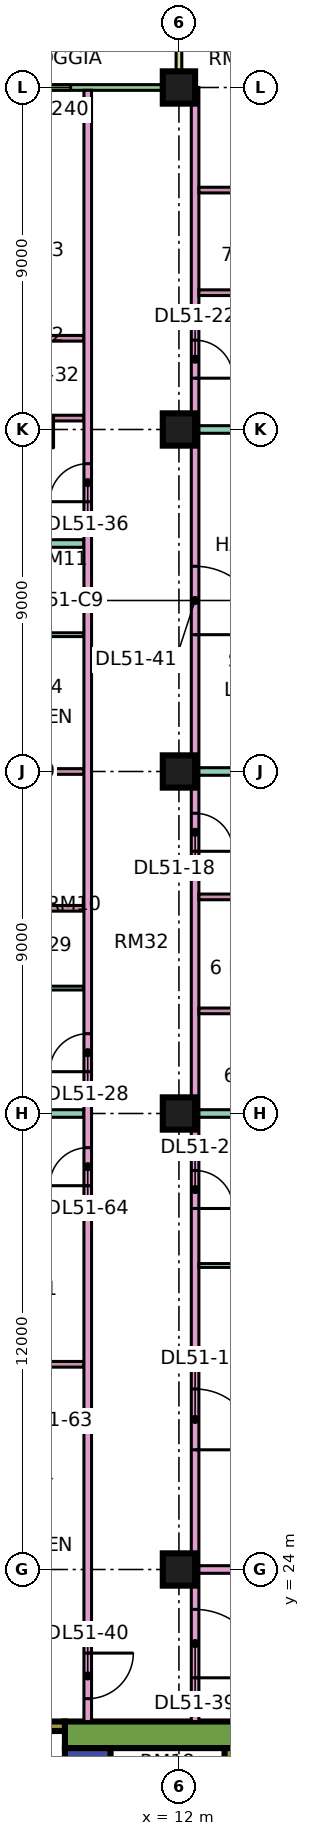
"""IFC4 building model, lengths in metres.
Left out: names, types, materials, properties, quantities, classifications, styles, units other than length and angle.
Written with IfcOpenShell. Run it as: python <this file> out.ifc"""

import sys

from ifc_helpers import new_model, si_unit, direction, frame, frame_2d, origin, origin_2d, place, context, subcontext, project, spatial, rectangle, extrude, element, fill, save


model = new_model("IFC4")
c1 = context("Model", 3, precision=1e-05, world=origin(), true_north=direction((0.0, 1.0)))
c2 = subcontext(c1, "Body", "Model", "MODEL_VIEW")
j1 = project(units=[si_unit("LENGTHUNIT", "METRE"), si_unit("PLANEANGLEUNIT", "RADIAN")], contexts=[c1])
p1 = place(None, origin())
s1 = spatial("IfcSite", under=j1, at=p1, CompositionType="ELEMENT")
p2 = place(p1, origin())
s2 = spatial("IfcBuilding", under=s1, at=p2, CompositionType="ELEMENT")
p3 = place(p2, frame((0.0, 0.0, 219.15)))
s3 = spatial("IfcBuildingStorey", under=s2, at=p3, CompositionType="ELEMENT", Elevation=219.15)
for number, where, z_axis, x_axis in (
    (1, (12.0, 24.0, 0.0), (0.0, 0.0, 1.0), (1.0, 0.0, 0.0)),
    (2, (12.0, 36.0, 0.0), (0.0, 0.0, 1.0), (1.0, 0.0, 0.0)),
    (3, (12.0, 45.0, 0.0), (0.0, 0.0, 1.0), (1.0, 0.0, 0.0)),
    (4, (12.0, 54.0, 0.0), (0.0, 0.0, 1.0), (1.0, 0.0, 0.0)),
    (5, (12.0, 63.0, 0.0), (0.0, 0.0, 1.0), (1.0, 0.0, 0.0)),
):
    element("IfcColumn", number, at=place(p3, frame(where, z_axis=z_axis, x_axis=x_axis)), inside=s3, PredefinedType="COLUMN", context=c2, shape_type="SweptSolid", body=[
        extrude(rectangle(XDim=0.85, YDim=0.85, at=origin_2d()), origin(), (0.0, 0.0, 1.0), 3.75),
    ])
p4 = place(p3, frame((9.0, 19.65, 0.0), z_axis=(0.0, 0.0, 1.0), x_axis=(1.0, 0.0, 0.0)))
e6 = element("IfcWall", 6, at=p4, inside=s3, PredefinedType="SHEAR", context=c2, shape_type="SweptSolid", body=[
    extrude(rectangle(XDim=25.0, YDim=0.7, at=frame_2d((12.5, 0.0))), origin(), (0.0, 0.0, 1.0), 3.75),
])
p5 = place(p4, frame((19.1, 0.0, 0.0)))
e7 = element("IfcOpeningElement", 7, at=p5, cuts=e6, PredefinedType="OPENING", context=c2, shape_type="SweptSolid", body=[
    extrude(rectangle(XDim=1.8, YDim=2.4, at=frame_2d((0.9, 1.2))), frame((0.0, 0.36, 0.0), z_axis=(0.0, -1.0, 0.0), x_axis=(1.0, 0.0, 0.0)), (0.0, 0.0, 1.0), 0.72),
])
p6 = place(p3, frame((9.6, 7.7, 0.0), z_axis=(0.0, 0.0, 1.0), x_axis=(0.0, 1.0, 0.0)))
e8 = element("IfcWall", 8, at=p6, inside=s3, PredefinedType="SHEAR", context=c2, shape_type="SweptSolid", body=[
    extrude(rectangle(XDim=11.6, YDim=1.2, at=frame_2d((5.8, 0.0))), origin(), (0.0, 0.0, 1.0), 3.75),
])
p7 = place(p6, frame((4.175, 0.0, 0.0)))
e9 = element("IfcOpeningElement", 9, at=p7, cuts=e8, PredefinedType="OPENING", context=c2, shape_type="SweptSolid", body=[
    extrude(rectangle(XDim=1.1, YDim=2.2, at=frame_2d((0.55, 1.1))), frame((0.0, 0.61, 0.0), z_axis=(0.0, -1.0, 0.0), x_axis=(1.0, 0.0, 0.0)), (0.0, 0.0, 1.0), 1.22),
])
p8 = place(p6, frame((6.675, 0.0, 0.0)))
e10 = element("IfcOpeningElement", 10, at=p8, cuts=e8, PredefinedType="OPENING", context=c2, shape_type="SweptSolid", body=[
    extrude(rectangle(XDim=1.1, YDim=2.2, at=frame_2d((0.55, 1.1))), frame((0.0, 0.61, 0.0), z_axis=(0.0, -1.0, 0.0), x_axis=(1.0, 0.0, 0.0)), (0.0, 0.0, 1.0), 1.22),
])
p9 = place(p6, frame((9.55, 0.0, 0.0)))
e11 = element("IfcOpeningElement", 11, at=p9, cuts=e8, PredefinedType="OPENING", context=c2, shape_type="SweptSolid", body=[
    extrude(rectangle(XDim=1.1, YDim=2.2, at=frame_2d((0.55, 1.1))), frame((0.0, 0.61, 0.0), z_axis=(0.0, -1.0, 0.0), x_axis=(1.0, 0.0, 0.0)), (0.0, 0.0, 1.0), 1.22),
])
p10 = place(p6, frame((1.85, 0.0, 0.0)))
e12 = element("IfcOpeningElement", 12, at=p10, cuts=e8, PredefinedType="OPENING", context=c2, shape_type="SweptSolid", body=[
    extrude(rectangle(XDim=0.9, YDim=2.1, at=frame_2d((0.45, 1.05))), frame((0.0, 0.61, 0.0), z_axis=(0.0, -1.0, 0.0), x_axis=(1.0, 0.0, 0.0)), (0.0, 0.0, 1.0), 1.22),
])
p11 = place(p3, frame((13.325, 7.7, 0.0), z_axis=(0.0, 0.0, 1.0), x_axis=(0.0, 1.0, 0.0)))
e13 = element("IfcWall", 13, at=p11, inside=s3, PredefinedType="SHEAR", context=c2, shape_type="SweptSolid", body=[
    extrude(rectangle(XDim=11.6, YDim=0.25, at=frame_2d((5.8, 0.0))), origin(), (0.0, 0.0, 1.0), 3.75),
])
p12 = place(p3, frame((2.1, 19.875, 0.0), z_axis=(0.0, 0.0, 1.0), x_axis=(1.0, 0.0, 0.0)))
e14 = element("IfcWall", 14, at=p12, inside=s3, PredefinedType="SHEAR", context=c2, shape_type="SweptSolid", body=[
    extrude(rectangle(XDim=6.9, YDim=0.25, at=frame_2d((3.45, 0.0))), origin(), (0.0, 0.0, 1.0), 3.75),
])
p13 = place(p12, frame((1.175, 0.0, 0.0)))
e15 = element("IfcOpeningElement", 15, at=p13, cuts=e14, PredefinedType="OPENING", context=c2, shape_type="SweptSolid", body=[
    extrude(rectangle(XDim=1.1, YDim=2.2, at=frame_2d((0.55, 1.1))), frame((0.0, 0.135, 0.0), z_axis=(0.0, -1.0, 0.0), x_axis=(1.0, 0.0, 0.0)), (0.0, 0.0, 1.0), 0.27),
])
p14 = place(p12, frame((4.6, 0.0, 0.0)))
e16 = element("IfcOpeningElement", 16, at=p14, cuts=e14, PredefinedType="OPENING", context=c2, shape_type="SweptSolid", body=[
    extrude(rectangle(XDim=1.2, YDim=2.2, at=frame_2d((0.6, 1.1))), frame((0.0, 0.135, 0.0), z_axis=(0.0, -1.0, 0.0), x_axis=(1.0, 0.0, 0.0)), (0.0, 0.0, 1.0), 0.27),
])
p15 = place(p3, frame((11.925, 63.0, 0.0), z_axis=(0.0, 0.0, 1.0), x_axis=(-1.0, 0.0, 0.0)))
e17 = element("IfcWall", 17, at=p15, inside=s3, PredefinedType="SOLIDWALL", context=c2, shape_type="SweptSolid", body=[
    extrude(rectangle(XDim=10.35, YDim=0.15, at=frame_2d((5.175, 0.0))), origin(), (0.0, 0.0, 1.0), 3.35),
])
p16 = place(p15, frame((2.775, 0.0, 0.45)))
e18 = element("IfcOpeningElement", 18, at=p16, cuts=e17, PredefinedType="OPENING", context=c2, shape_type="SweptSolid", body=[
    extrude(rectangle(XDim=1.8, YDim=2.4, at=frame_2d((0.9, 1.2))), frame((0.0, 0.085, 0.0), z_axis=(0.0, -1.0, 0.0), x_axis=(1.0, 0.0, 0.0)), (0.0, 0.0, 1.0), 0.17),
])
p17 = place(p15, frame((6.788, 0.0, 0.0)))
e19 = element("IfcOpeningElement", 19, at=p17, cuts=e17, PredefinedType="OPENING", context=c2, shape_type="SweptSolid", body=[
    extrude(rectangle(XDim=1.8, YDim=2.4, at=frame_2d((0.9, 1.2))), frame((0.0, 0.085, 0.0), z_axis=(0.0, -1.0, 0.0), x_axis=(1.0, 0.0, 0.0)), (0.0, 0.0, 1.0), 0.17),
])
p18 = place(p3, frame((12.0, 64.5, 0.0), z_axis=(0.0, 0.0, 1.0), x_axis=(0.0, -1.0, 0.0)))
e20 = element("IfcWall", 20, at=p18, inside=s3, PredefinedType="SOLIDWALL", context=c2, shape_type="SweptSolid", body=[
    extrude(rectangle(XDim=1.5, YDim=0.15, at=frame_2d((0.75, 0.0))), origin(), (0.0, 0.0, 1.0), 3.35),
])
p19 = place(p3, frame((-1.35, 22.4, 0.0), z_axis=(0.0, 0.0, 1.0), x_axis=(1.0, 0.0, 0.0)))
e21 = element("IfcWall", 21, at=p19, inside=s3, PredefinedType="PARTITIONING", context=c2, shape_type="SweptSolid", body=[
    extrude(rectangle(XDim=10.85, YDim=0.2, at=frame_2d((5.425, 0.0))), origin(), (0.0, 0.0, 1.0), 3.35),
])
p20 = place(p3, frame((0.0, 36.0, 0.0), z_axis=(0.0, 0.0, 1.0), x_axis=(1.0, 0.0, 0.0)))
e22 = element("IfcWall", 22, at=p20, inside=s3, PredefinedType="PARTITIONING", context=c2, shape_type="SweptSolid", body=[
    extrude(rectangle(XDim=9.5, YDim=0.2, at=frame_2d((4.75, 0.0))), origin(), (0.0, 0.0, 1.0), 3.35),
])
p21 = place(p3, frame((5.65, 51.0, 0.0), z_axis=(0.0, 0.0, 1.0), x_axis=(1.0, 0.0, 0.0)))
e23 = element("IfcWall", 23, at=p21, inside=s3, PredefinedType="PARTITIONING", context=c2, shape_type="SweptSolid", body=[
    extrude(rectangle(XDim=3.85, YDim=0.2, at=frame_2d((1.925, 0.0))), origin(), (0.0, 0.0, 1.0), 3.35),
])
for number, where, z_axis, x_axis in (
    (24, (6.675, 29.4, 0.0), (0.0, 0.0, 1.0), (1.0, 0.0, 0.0)),
    (25, (6.675, 33.3, 0.0), (0.0, 0.0, 1.0), (1.0, 0.0, 0.0)),
):
    element("IfcWall", number, at=place(p3, frame(where, z_axis=z_axis, x_axis=x_axis)), inside=s3, PredefinedType="PARTITIONING", context=c2, shape_type="SweptSolid", body=[
        extrude(rectangle(XDim=2.825, YDim=0.15, at=frame_2d((1.413, 0.0))), origin(), (0.0, 0.0, 1.0), 3.35),
    ])
p22 = place(p3, frame((6.675, 39.3, 0.0), z_axis=(0.0, 0.0, 1.0), x_axis=(1.0, 0.0, 0.0)))
e26 = element("IfcWall", 26, at=p22, inside=s3, PredefinedType="PARTITIONING", context=c2, shape_type="SweptSolid", body=[
    extrude(rectangle(XDim=2.825, YDim=0.1, at=frame_2d((1.413, 0.0))), origin(), (0.0, 0.0, 1.0), 3.35),
])
p23 = place(p22, frame((0.975, 0.0, 0.0)))
e27 = element("IfcOpeningElement", 27, at=p23, cuts=e26, PredefinedType="OPENING", context=c2, shape_type="SweptSolid", body=[
    extrude(rectangle(XDim=0.9, YDim=2.1, at=frame_2d((0.45, 1.05))), frame((0.0, 0.06, 0.0), z_axis=(0.0, -1.0, 0.0), x_axis=(1.0, 0.0, 0.0)), (0.0, 0.0, 1.0), 0.12),
])
for number, where, z_axis, x_axis in (
    (28, (6.675, 41.4, 0.0), (0.0, 0.0, 1.0), (1.0, 0.0, 0.0)),
    (29, (6.675, 45.0, 0.0), (0.0, 0.0, 1.0), (1.0, 0.0, 0.0)),
):
    element("IfcWall", number, at=place(p3, frame(where, z_axis=z_axis, x_axis=x_axis)), inside=s3, PredefinedType="PARTITIONING", context=c2, shape_type="SweptSolid", body=[
        extrude(rectangle(XDim=2.825, YDim=0.15, at=frame_2d((1.413, 0.0))), origin(), (0.0, 0.0, 1.0), 3.35),
    ])
p24 = place(p3, frame((6.675, 48.6, 0.0), z_axis=(0.0, 0.0, 1.0), x_axis=(1.0, 0.0, 0.0)))
e30 = element("IfcWall", 30, at=p24, inside=s3, PredefinedType="PARTITIONING", context=c2, shape_type="SweptSolid", body=[
    extrude(rectangle(XDim=2.825, YDim=0.1, at=frame_2d((1.413, 0.0))), origin(), (0.0, 0.0, 1.0), 3.35),
])
p25 = place(p3, frame((6.975, 54.3, 0.0), z_axis=(0.0, 0.0, 1.0), x_axis=(1.0, 0.0, 0.0)))
e31 = element("IfcWall", 31, at=p25, inside=s3, PredefinedType="PARTITIONING", context=c2, shape_type="SweptSolid", body=[
    extrude(rectangle(XDim=2.525, YDim=0.15, at=frame_2d((1.262, 0.0))), origin(), (0.0, 0.0, 1.0), 3.35),
])
p26 = place(p25, frame((0.925, 0.0, 0.0)))
e32 = element("IfcOpeningElement", 32, at=p26, cuts=e31, PredefinedType="OPENING", context=c2, shape_type="SweptSolid", body=[
    extrude(rectangle(XDim=0.8, YDim=2.1, at=frame_2d((0.4, 1.05))), frame((0.0, 0.085, 0.0), z_axis=(0.0, -1.0, 0.0), x_axis=(1.0, 0.0, 0.0)), (0.0, 0.0, 1.0), 0.17),
])
p27 = place(p3, frame((6.975, 56.4, 0.0), z_axis=(0.0, 0.0, 1.0), x_axis=(1.0, 0.0, 0.0)))
e33 = element("IfcWall", 33, at=p27, inside=s3, PredefinedType="PARTITIONING", context=c2, shape_type="SweptSolid", body=[
    extrude(rectangle(XDim=2.525, YDim=0.15, at=frame_2d((1.262, 0.0))), origin(), (0.0, 0.0, 1.0), 3.35),
])
p28 = place(p3, frame((9.6, 20.0, 0.0), z_axis=(0.0, 0.0, 1.0), x_axis=(0.0, 1.0, 0.0)))
e34 = element("IfcWall", 34, at=p28, inside=s3, PredefinedType="PARTITIONING", context=c2, shape_type="SweptSolid", body=[
    extrude(rectangle(XDim=42.926, YDim=0.2, at=frame_2d((21.463, 0.0))), origin(), (0.0, 0.0, 1.0), 3.35),
])
p29 = place(p28, frame((17.1, 0.0, 0.0)))
e35 = element("IfcOpeningElement", 35, at=p29, cuts=e34, PredefinedType="OPENING", context=c2, shape_type="SweptSolid", body=[
    extrude(rectangle(XDim=1.0, YDim=2.1, at=frame_2d((0.5, 1.05))), frame((0.0, 0.11, 0.0), z_axis=(0.0, -1.0, 0.0), x_axis=(1.0, 0.0, 0.0)), (0.0, 0.0, 1.0), 0.22),
])
p30 = place(p28, frame((32.1, 0.0, 0.0)))
e36 = element("IfcOpeningElement", 36, at=p30, cuts=e34, PredefinedType="OPENING", context=c2, shape_type="SweptSolid", body=[
    extrude(rectangle(XDim=1.0, YDim=2.1, at=frame_2d((0.5, 1.05))), frame((0.0, 0.11, 0.0), z_axis=(0.0, -1.0, 0.0), x_axis=(1.0, 0.0, 0.0)), (0.0, 0.0, 1.0), 0.22),
])
p31 = place(p28, frame((0.6, 0.0, 0.0)))
e37 = element("IfcOpeningElement", 37, at=p31, cuts=e34, PredefinedType="OPENING", context=c2, shape_type="SweptSolid", body=[
    extrude(rectangle(XDim=1.2, YDim=2.1, at=frame_2d((0.6, 1.05))), frame((0.0, 0.11, 0.0), z_axis=(0.0, -1.0, 0.0), x_axis=(1.0, 0.0, 0.0)), (0.0, 0.0, 1.0), 0.22),
])
p32 = place(p28, frame((14.1, 0.0, 0.0)))
e38 = element("IfcOpeningElement", 38, at=p32, cuts=e34, PredefinedType="OPENING", context=c2, shape_type="SweptSolid", body=[
    extrude(rectangle(XDim=1.0, YDim=2.1, at=frame_2d((0.5, 1.05))), frame((0.0, 0.11, 0.0), z_axis=(0.0, -1.0, 0.0), x_axis=(1.0, 0.0, 0.0)), (0.0, 0.0, 1.0), 0.22),
])
p33 = place(p3, frame((12.425, 20.0, 0.0), z_axis=(0.0, 0.0, 1.0), x_axis=(0.0, 1.0, 0.0)))
e39 = element("IfcWall", 39, at=p33, inside=s3, PredefinedType="PARTITIONING", context=c2, shape_type="SweptSolid", body=[
    extrude(rectangle(XDim=43.0, YDim=0.2, at=frame_2d((21.5, 0.0))), origin(), (0.0, 0.0, 1.0), 3.35),
])
p34 = place(p33, frame((7.15, 0.0, 0.0)))
e40 = element("IfcOpeningElement", 40, at=p34, cuts=e39, PredefinedType="OPENING", context=c2, shape_type="SweptSolid", body=[
    extrude(rectangle(XDim=1.6, YDim=2.1, at=frame_2d((0.8, 1.05))), frame((0.0, 0.11, 0.0), z_axis=(0.0, -1.0, 0.0), x_axis=(1.0, 0.0, 0.0)), (0.0, 0.0, 1.0), 0.22),
])
p35 = place(p33, frame((13.5, 0.0, 0.0)))
e41 = element("IfcOpeningElement", 41, at=p35, cuts=e39, PredefinedType="OPENING", context=c2, shape_type="SweptSolid", body=[
    extrude(rectangle(XDim=1.0, YDim=2.1, at=frame_2d((0.5, 1.05))), frame((0.0, 0.11, 0.0), z_axis=(0.0, -1.0, 0.0), x_axis=(1.0, 0.0, 0.0)), (0.0, 0.0, 1.0), 0.22),
])
p36 = place(p33, frame((22.9, 0.0, 0.0)))
e42 = element("IfcOpeningElement", 42, at=p36, cuts=e39, PredefinedType="OPENING", context=c2, shape_type="SweptSolid", body=[
    extrude(rectangle(XDim=1.0, YDim=2.1, at=frame_2d((0.5, 1.05))), frame((0.0, 0.11, 0.0), z_axis=(0.0, -1.0, 0.0), x_axis=(1.0, 0.0, 0.0)), (0.0, 0.0, 1.0), 0.22),
])
p37 = place(p33, frame((35.35, 0.0, 0.0)))
e43 = element("IfcOpeningElement", 43, at=p37, cuts=e39, PredefinedType="OPENING", context=c2, shape_type="SweptSolid", body=[
    extrude(rectangle(XDim=1.0, YDim=2.1, at=frame_2d((0.5, 1.05))), frame((0.0, 0.11, 0.0), z_axis=(0.0, -1.0, 0.0), x_axis=(1.0, 0.0, 0.0)), (0.0, 0.0, 1.0), 0.22),
])
p38 = place(p33, frame((1.15, 0.0, 0.0)))
e44 = element("IfcOpeningElement", 44, at=p38, cuts=e39, PredefinedType="OPENING", context=c2, shape_type="SweptSolid", body=[
    extrude(rectangle(XDim=1.8, YDim=2.1, at=frame_2d((0.9, 1.05))), frame((0.0, 0.11, 0.0), z_axis=(0.0, -1.0, 0.0), x_axis=(1.0, 0.0, 0.0)), (0.0, 0.0, 1.0), 0.22),
])
p39 = place(p33, frame((28.6, 0.0, 0.0)))
e45 = element("IfcOpeningElement", 45, at=p39, cuts=e39, PredefinedType="OPENING", context=c2, shape_type="SweptSolid", body=[
    extrude(rectangle(XDim=1.8, YDim=2.1, at=frame_2d((0.9, 1.05))), frame((0.0, 0.11, 0.0), z_axis=(0.0, -1.0, 0.0), x_axis=(1.0, 0.0, 0.0)), (0.0, 0.0, 1.0), 0.22),
])
p40 = place(p3, frame((12.525, 24.0, 0.0), z_axis=(0.0, 0.0, 1.0), x_axis=(1.0, 0.0, 0.0)))
e46 = element("IfcWall", 46, at=p40, inside=s3, PredefinedType="PARTITIONING", context=c2, shape_type="SweptSolid", body=[
    extrude(rectangle(XDim=8.975, YDim=0.2, at=frame_2d((4.488, 0.0))), origin(), (0.0, 0.0, 1.0), 3.35),
])
p41 = place(p3, frame((12.525, 32.0, 0.0), z_axis=(0.0, 0.0, 1.0), x_axis=(1.0, 0.0, 0.0)))
e47 = element("IfcWall", 47, at=p41, inside=s3, PredefinedType="PARTITIONING", context=c2, shape_type="SweptSolid", body=[
    extrude(rectangle(XDim=8.975, YDim=0.1, at=frame_2d((4.488, 0.0))), origin(), (0.0, 0.0, 1.0), 3.35),
])
p42 = place(p3, frame((12.525, 36.0, 0.0), z_axis=(0.0, 0.0, 1.0), x_axis=(1.0, 0.0, 0.0)))
e48 = element("IfcWall", 48, at=p42, inside=s3, PredefinedType="PARTITIONING", context=c2, shape_type="SweptSolid", body=[
    extrude(rectangle(XDim=11.475, YDim=0.2, at=frame_2d((5.738, 0.0))), origin(), (0.0, 0.0, 1.0), 3.35),
])
p43 = place(p3, frame((12.525, 38.7, 0.0), z_axis=(0.0, 0.0, 1.0), x_axis=(1.0, 0.0, 0.0)))
e49 = element("IfcWall", 49, at=p43, inside=s3, PredefinedType="PARTITIONING", context=c2, shape_type="SweptSolid", body=[
    extrude(rectangle(XDim=4.025, YDim=0.15, at=frame_2d((2.013, 0.0))), origin(), (0.0, 0.0, 1.0), 3.35),
])
p44 = place(p3, frame((12.525, 41.7, 0.0), z_axis=(0.0, 0.0, 1.0), x_axis=(1.0, 0.0, 0.0)))
e50 = element("IfcWall", 50, at=p44, inside=s3, PredefinedType="PARTITIONING", context=c2, shape_type="SweptSolid", body=[
    extrude(rectangle(XDim=4.025, YDim=0.15, at=frame_2d((2.013, 0.0))), origin(), (0.0, 0.0, 1.0), 3.35),
])
p45 = place(p44, frame((1.55, 0.0, 0.0)))
e51 = element("IfcOpeningElement", 51, at=p45, cuts=e50, PredefinedType="OPENING", context=c2, shape_type="SweptSolid", body=[
    extrude(rectangle(XDim=0.8, YDim=2.1, at=frame_2d((0.4, 1.05))), frame((0.0, 0.085, 0.0), z_axis=(0.0, -1.0, 0.0), x_axis=(1.0, 0.0, 0.0)), (0.0, 0.0, 1.0), 0.17),
])
p46 = place(p3, frame((12.525, 45.0, 0.0), z_axis=(0.0, 0.0, 1.0), x_axis=(1.0, 0.0, 0.0)))
e52 = element("IfcWall", 52, at=p46, inside=s3, PredefinedType="PARTITIONING", context=c2, shape_type="SweptSolid", body=[
    extrude(rectangle(XDim=11.475, YDim=0.2, at=frame_2d((5.738, 0.0))), origin(), (0.0, 0.0, 1.0), 3.35),
])
p47 = place(p3, frame((12.525, 54.0, 0.0), z_axis=(0.0, 0.0, 1.0), x_axis=(1.0, 0.0, 0.0)))
e53 = element("IfcWall", 53, at=p47, inside=s3, PredefinedType="PARTITIONING", context=c2, shape_type="SweptSolid", body=[
    extrude(rectangle(XDim=11.401, YDim=0.2, at=frame_2d((5.701, 0.0))), origin(), (0.0, 0.0, 1.0), 3.35),
])
for number, where, z_axis, x_axis in (
    (54, (12.525, 57.6, 0.0), (0.0, 0.0, 1.0), (1.0, 0.0, 0.0)),
    (55, (12.525, 60.3, 0.0), (0.0, 0.0, 1.0), (1.0, 0.0, 0.0)),
):
    element("IfcWall", number, at=place(p3, frame(where, z_axis=z_axis, x_axis=x_axis)), inside=s3, PredefinedType="PARTITIONING", context=c2, shape_type="SweptSolid", body=[
        extrude(rectangle(XDim=4.625, YDim=0.15, at=frame_2d((2.312, 0.0))), origin(), (0.0, 0.0, 1.0), 3.35),
    ])
p48 = place(p16, origin())
e56 = element("IfcWindow", 56, at=p48, inside=s3, PartitioningType="SINGLE_PANEL", PredefinedType="WINDOW", context=c2, shape_type="SweptSolid", body=[
    extrude(rectangle(XDim=1.8, YDim=2.4, at=frame_2d((0.9, 1.2))), frame((0.0, 0.03, 0.0), z_axis=(0.0, -1.0, 0.0), x_axis=(1.0, 0.0, 0.0)), (0.0, 0.0, 1.0), 0.06),
])
fill(e18, e56)
p49 = place(p34, frame((1.6, 0.0, 0.0), z_axis=(0.0, 0.0, 1.0), x_axis=(-1.0, 0.0, 0.0)))
e57 = element("IfcDoor", 57, at=p49, inside=s3, OperationType="DOUBLE_DOOR_SINGLE_SWING", PredefinedType="DOOR", context=c2, shape_type="SweptSolid", body=[
    extrude(rectangle(XDim=1.6, YDim=2.1, at=frame_2d((0.8, 1.05))), frame((0.0, 0.025, 0.0), z_axis=(0.0, -1.0, 0.0), x_axis=(1.0, 0.0, 0.0)), (0.0, 0.0, 1.0), 0.05),
])
fill(e40, e57)
p50 = place(p35, frame((1.0, 0.0, 0.0), z_axis=(0.0, 0.0, 1.0), x_axis=(-1.0, 0.0, 0.0)))
e58 = element("IfcDoor", 58, at=p50, inside=s3, OperationType="SINGLE_SWING_LEFT", PredefinedType="DOOR", context=c2, shape_type="SweptSolid", body=[
    extrude(rectangle(XDim=1.0, YDim=2.1, at=frame_2d((0.5, 1.05))), frame((0.0, 0.025, 0.0), z_axis=(0.0, -1.0, 0.0), x_axis=(1.0, 0.0, 0.0)), (0.0, 0.0, 1.0), 0.05),
])
fill(e41, e58)
p51 = place(p36, frame((1.0, 0.0, 0.0), z_axis=(0.0, 0.0, 1.0), x_axis=(-1.0, 0.0, 0.0)))
e59 = element("IfcDoor", 59, at=p51, inside=s3, OperationType="SINGLE_SWING_LEFT", PredefinedType="DOOR", context=c2, shape_type="SweptSolid", body=[
    extrude(rectangle(XDim=1.0, YDim=2.1, at=frame_2d((0.5, 1.05))), frame((0.0, 0.025, 0.0), z_axis=(0.0, -1.0, 0.0), x_axis=(1.0, 0.0, 0.0)), (0.0, 0.0, 1.0), 0.05),
])
fill(e42, e59)
p52 = place(p37, frame((1.0, 0.0, 0.0), z_axis=(0.0, 0.0, 1.0), x_axis=(-1.0, 0.0, 0.0)))
e60 = element("IfcDoor", 60, at=p52, inside=s3, OperationType="SINGLE_SWING_LEFT", PredefinedType="DOOR", context=c2, shape_type="SweptSolid", body=[
    extrude(rectangle(XDim=1.0, YDim=2.1, at=frame_2d((0.5, 1.05))), frame((0.0, 0.025, 0.0), z_axis=(0.0, -1.0, 0.0), x_axis=(1.0, 0.0, 0.0)), (0.0, 0.0, 1.0), 0.05),
])
fill(e43, e60)
p53 = place(p29, origin())
e61 = element("IfcDoor", 61, at=p53, inside=s3, OperationType="SINGLE_SWING_LEFT", PredefinedType="DOOR", context=c2, shape_type="SweptSolid", body=[
    extrude(rectangle(XDim=1.0, YDim=2.1, at=frame_2d((0.5, 1.05))), frame((0.0, 0.025, 0.0), z_axis=(0.0, -1.0, 0.0), x_axis=(1.0, 0.0, 0.0)), (0.0, 0.0, 1.0), 0.05),
])
fill(e35, e61)
p54 = place(p26, origin())
e62 = element("IfcDoor", 62, at=p54, inside=s3, OperationType="SINGLE_SWING_RIGHT", PredefinedType="DOOR", context=c2, shape_type="SweptSolid", body=[
    extrude(rectangle(XDim=0.8, YDim=2.1, at=frame_2d((0.4, 1.05))), frame((0.0, 0.025, 0.0), z_axis=(0.0, -1.0, 0.0), x_axis=(1.0, 0.0, 0.0)), (0.0, 0.0, 1.0), 0.05),
])
fill(e32, e62)
p55 = place(p30, origin())
e63 = element("IfcDoor", 63, at=p55, inside=s3, OperationType="SINGLE_SWING_LEFT", PredefinedType="DOOR", context=c2, shape_type="SweptSolid", body=[
    extrude(rectangle(XDim=1.0, YDim=2.1, at=frame_2d((0.5, 1.05))), frame((0.0, 0.025, 0.0), z_axis=(0.0, -1.0, 0.0), x_axis=(1.0, 0.0, 0.0)), (0.0, 0.0, 1.0), 0.05),
])
fill(e36, e63)
p56 = place(p38, frame((1.8, 0.0, 0.0), z_axis=(0.0, 0.0, 1.0), x_axis=(-1.0, 0.0, 0.0)))
e64 = element("IfcDoor", 64, at=p56, inside=s3, OperationType="DOUBLE_DOOR_SINGLE_SWING", PredefinedType="DOOR", context=c2, shape_type="SweptSolid", body=[
    extrude(rectangle(XDim=1.8, YDim=2.1, at=frame_2d((0.9, 1.05))), frame((0.0, 0.025, 0.0), z_axis=(0.0, -1.0, 0.0), x_axis=(1.0, 0.0, 0.0)), (0.0, 0.0, 1.0), 0.05),
])
fill(e44, e64)
p57 = place(p31, origin())
e65 = element("IfcDoor", 65, at=p57, inside=s3, OperationType="SINGLE_SWING_RIGHT", PredefinedType="DOOR", context=c2, shape_type="SweptSolid", body=[
    extrude(rectangle(XDim=1.2, YDim=2.1, at=frame_2d((0.6, 1.05))), frame((0.0, 0.025, 0.0), z_axis=(0.0, -1.0, 0.0), x_axis=(1.0, 0.0, 0.0)), (0.0, 0.0, 1.0), 0.05),
])
fill(e37, e65)
p58 = place(p39, frame((1.8, 0.0, 0.0), z_axis=(0.0, 0.0, 1.0), x_axis=(-1.0, 0.0, 0.0)))
e66 = element("IfcDoor", 66, at=p58, inside=s3, OperationType="DOUBLE_DOOR_SINGLE_SWING", PredefinedType="DOOR", context=c2, shape_type="SweptSolid", body=[
    extrude(rectangle(XDim=1.8, YDim=2.1, at=frame_2d((0.9, 1.05))), frame((0.0, 0.025, 0.0), z_axis=(0.0, -1.0, 0.0), x_axis=(1.0, 0.0, 0.0)), (0.0, 0.0, 1.0), 0.05),
])
fill(e45, e66)
p59 = place(p32, origin())
e67 = element("IfcDoor", 67, at=p59, inside=s3, OperationType="SINGLE_SWING_LEFT", PredefinedType="DOOR", context=c2, shape_type="SweptSolid", body=[
    extrude(rectangle(XDim=1.0, YDim=2.1, at=frame_2d((0.5, 1.05))), frame((0.0, 0.025, 0.0), z_axis=(0.0, -1.0, 0.0), x_axis=(1.0, 0.0, 0.0)), (0.0, 0.0, 1.0), 0.05),
])
fill(e38, e67)
save(model, sys.argv[1])
